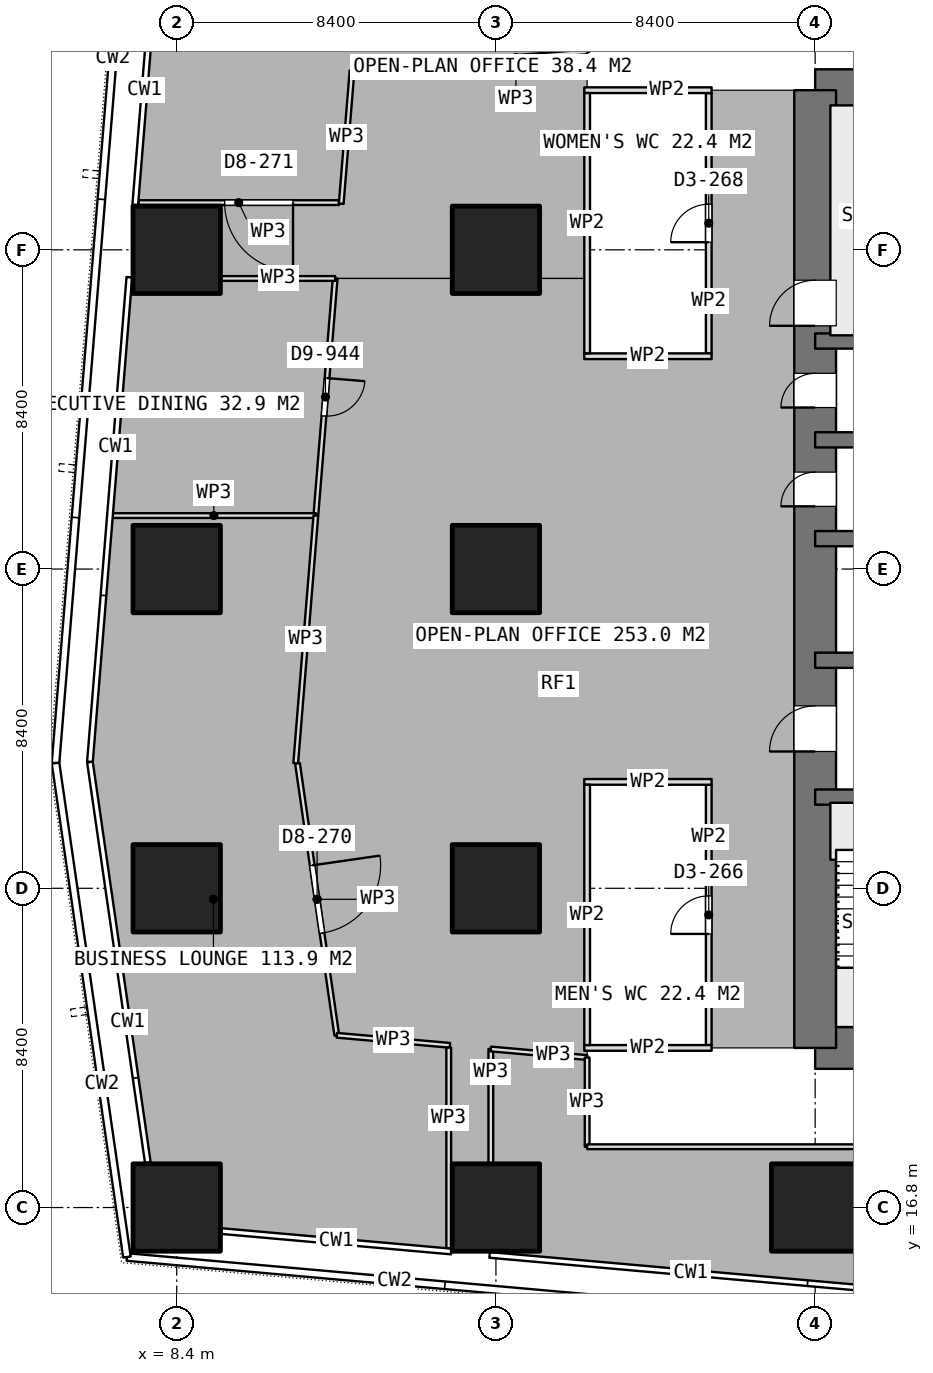
"""IFC4 building model, lengths in metres.
Left out: names, types, materials, properties, quantities, classifications, styles, units other than length and angle.
Written with IfcOpenShell. Run it as: python <this file> out.ifc"""

import sys

from ifc_helpers import new_model, si_unit, direction, frame, frame_2d, origin, origin_2d, place, context, subcontext, project, spatial, rectangle, extrude, element, fill, save


model = new_model("IFC4")
c1 = context("Model", 3, precision=1e-05, world=origin(), true_north=direction((0.0, 1.0)))
c2 = subcontext(c1, "Body", "Model", "MODEL_VIEW")
j1 = project(units=[si_unit("LENGTHUNIT", "METRE"), si_unit("PLANEANGLEUNIT", "RADIAN")], contexts=[c1])
p1 = place(None, origin())
s1 = spatial("IfcSite", under=j1, at=p1, CompositionType="ELEMENT")
p2 = place(p1, origin())
s2 = spatial("IfcBuilding", under=s1, at=p2, CompositionType="ELEMENT")
p3 = place(p2, frame((0.0, 0.0, 250.1)))
s3 = spatial("IfcBuildingStorey", under=s2, at=p3, CompositionType="ELEMENT", Elevation=250.1)
for number, where, z_axis, x_axis in (
    (1, (25.2, 21.0, 0.0), (0.0, 0.0, 1.0), (1.0, 0.0, 0.0)),
    (2, (25.2, 46.2, 0.0), (0.0, 0.0, 1.0), (1.0, 0.0, 0.0)),
):
    element("IfcWall", number, at=place(p3, frame(where, z_axis=z_axis, x_axis=x_axis)), inside=s3, PredefinedType="SHEAR", context=c2, shape_type="SweptSolid", body=[
        extrude(rectangle(XDim=10.4, YDim=1.1, at=frame_2d((5.2, 0.0))), origin(), (0.0, 0.0, 1.0), 3.75),
    ])
p4 = place(p3, frame((25.2, 21.0, 0.0), z_axis=(0.0, 0.0, 1.0), x_axis=(0.0, 1.0, 0.0)))
e3 = element("IfcWall", 3, at=p4, inside=s3, PredefinedType="SHEAR", context=c2, shape_type="SweptSolid", body=[
    extrude(rectangle(XDim=25.2, YDim=1.1, at=frame_2d((12.6, 0.0))), origin(), (0.0, 0.0, 1.0), 3.75),
])
p5 = place(p4, frame((7.8, 0.0, 0.0)))
e4 = element("IfcOpeningElement", 4, at=p5, cuts=e3, PredefinedType="OPENING", context=c2, shape_type="SweptSolid", body=[
    extrude(rectangle(XDim=1.2, YDim=2.1, at=frame_2d((0.6, 1.05))), frame((0.0, 0.56, 0.0), z_axis=(0.0, -1.0, 0.0), x_axis=(1.0, 0.0, 0.0)), (0.0, 0.0, 1.0), 1.12),
])
p6 = place(p4, frame((14.25, 0.0, 0.0)))
e5 = element("IfcOpeningElement", 5, at=p6, cuts=e3, PredefinedType="OPENING", context=c2, shape_type="SweptSolid", body=[
    extrude(rectangle(XDim=0.9, YDim=2.1, at=frame_2d((0.45, 1.05))), frame((0.0, 0.56, 0.0), z_axis=(0.0, -1.0, 0.0), x_axis=(1.0, 0.0, 0.0)), (0.0, 0.0, 1.0), 1.12),
])
p7 = place(p4, frame((16.85, 0.0, 0.0)))
e6 = element("IfcOpeningElement", 6, at=p7, cuts=e3, PredefinedType="OPENING", context=c2, shape_type="SweptSolid", body=[
    extrude(rectangle(XDim=0.9, YDim=2.1, at=frame_2d((0.45, 1.05))), frame((0.0, 0.56, 0.0), z_axis=(0.0, -1.0, 0.0), x_axis=(1.0, 0.0, 0.0)), (0.0, 0.0, 1.0), 1.12),
])
p8 = place(p4, frame((19.0, 0.0, 0.0)))
e7 = element("IfcOpeningElement", 7, at=p8, cuts=e3, PredefinedType="OPENING", context=c2, shape_type="SweptSolid", body=[
    extrude(rectangle(XDim=1.2, YDim=2.1, at=frame_2d((0.6, 1.05))), frame((0.0, 0.56, 0.0), z_axis=(0.0, -1.0, 0.0), x_axis=(1.0, 0.0, 0.0)), (0.0, 0.0, 1.0), 1.12),
])
p9 = place(p3, frame((25.2, 27.6, 0.0), z_axis=(0.0, 0.0, 1.0), x_axis=(1.0, 0.0, 0.0)))
e8 = element("IfcWall", 8, at=p9, inside=s3, PredefinedType="SHEAR", context=c2, shape_type="SweptSolid", body=[
    extrude(rectangle(XDim=6.6, YDim=0.4, at=frame_2d((3.3, 0.0))), origin(), (0.0, 0.0, 1.0), 3.75),
])
p10 = place(p9, frame((5.0, 0.0, 0.0)))
e9 = element("IfcOpeningElement", 9, at=p10, cuts=e8, PredefinedType="OPENING", context=c2, shape_type="SweptSolid", body=[
    extrude(rectangle(XDim=1.2, YDim=2.1, at=frame_2d((0.6, 1.05))), frame((0.0, 0.21, 0.0), z_axis=(0.0, -1.0, 0.0), x_axis=(1.0, 0.0, 0.0)), (0.0, 0.0, 1.0), 0.42),
])
p11 = place(p3, frame((25.2, 31.2, 0.0), z_axis=(0.0, 0.0, 1.0), x_axis=(1.0, 0.0, 0.0)))
e10 = element("IfcWall", 10, at=p11, inside=s3, PredefinedType="SHEAR", context=c2, shape_type="SweptSolid", body=[
    extrude(rectangle(XDim=6.6, YDim=0.4, at=frame_2d((3.3, 0.0))), origin(), (0.0, 0.0, 1.0), 3.75),
])
p12 = place(p11, frame((2.65, 0.0, 0.0)))
e11 = element("IfcOpeningElement", 11, at=p12, cuts=e10, PredefinedType="OPENING", context=c2, shape_type="SweptSolid", body=[
    extrude(rectangle(XDim=1.3, YDim=2.1, at=frame_2d((0.65, 1.05))), frame((0.0, 0.21, 0.0), z_axis=(0.0, -1.0, 0.0), x_axis=(1.0, 0.0, 0.0)), (0.0, 0.0, 1.0), 0.42),
])
for number, where, z_axis, x_axis in (
    (12, (25.2, 34.4, 0.0), (0.0, 0.0, 1.0), (1.0, 0.0, 0.0)),
    (13, (25.2, 37.0, 0.0), (0.0, 0.0, 1.0), (1.0, 0.0, 0.0)),
    (14, (25.2, 39.6, 0.0), (0.0, 0.0, 1.0), (1.0, 0.0, 0.0)),
):
    element("IfcWall", number, at=place(p3, frame(where, z_axis=z_axis, x_axis=x_axis)), inside=s3, PredefinedType="SHEAR", context=c2, shape_type="SweptSolid", body=[
        extrude(rectangle(XDim=6.6, YDim=0.4, at=frame_2d((3.3, 0.0))), origin(), (0.0, 0.0, 1.0), 3.75),
    ])
for number, where, z_axis, x_axis in (
    (15, (8.4, 16.8, 0.0), (0.0, 0.0, 1.0), (1.0, 0.0, 0.0)),
    (16, (8.4, 25.2, 0.0), (0.0, 0.0, 1.0), (1.0, 0.0, 0.0)),
    (17, (8.4, 33.6, 0.0), (0.0, 0.0, 1.0), (1.0, 0.0, 0.0)),
    (18, (8.4, 42.0, 0.0), (0.0, 0.0, 1.0), (1.0, 0.0, 0.0)),
    (19, (16.8, 16.8, 0.0), (0.0, 0.0, 1.0), (1.0, 0.0, 0.0)),
    (20, (16.8, 25.2, 0.0), (0.0, 0.0, 1.0), (1.0, 0.0, 0.0)),
    (21, (16.8, 33.6, 0.0), (0.0, 0.0, 1.0), (1.0, 0.0, 0.0)),
    (22, (16.8, 42.0, 0.0), (0.0, 0.0, 1.0), (1.0, 0.0, 0.0)),
    (23, (25.2, 16.8, 0.0), (0.0, 0.0, 1.0), (1.0, 0.0, 0.0)),
):
    element("IfcColumn", number, at=place(p3, frame(where, z_axis=z_axis, x_axis=x_axis)), inside=s3, PredefinedType="COLUMN", context=c2, shape_type="SweptSolid", body=[
        extrude(rectangle(XDim=2.3, YDim=2.3, at=origin_2d()), origin(), (0.0, 0.0, 1.0), 3.75),
    ])
for number, where, z_axis, x_axis in (
    (24, (19.125, 39.2, 0.0), (0.0, 0.0, 1.0), (1.0, 0.0, 0.0)),
    (25, (19.125, 46.2, 0.0), (0.0, 0.0, 1.0), (1.0, 0.0, 0.0)),
):
    element("IfcWall", number, at=place(p3, frame(where, z_axis=z_axis, x_axis=x_axis)), inside=s3, PredefinedType="PARTITIONING", context=c2, shape_type="SweptSolid", body=[
        extrude(rectangle(XDim=3.35, YDim=0.15, at=frame_2d((1.675, 0.0))), origin(), (0.0, 0.0, 1.0), 3.5),
    ])
p13 = place(p3, frame((19.2, 39.275, 0.0), z_axis=(0.0, 0.0, 1.0), x_axis=(0.0, 1.0, 0.0)))
e26 = element("IfcWall", 26, at=p13, inside=s3, PredefinedType="PARTITIONING", context=c2, shape_type="SweptSolid", body=[
    extrude(rectangle(XDim=6.85, YDim=0.15, at=frame_2d((3.425, 0.0))), origin(), (0.0, 0.0, 1.0), 3.5),
])
p14 = place(p3, frame((22.4, 39.275, 0.0), z_axis=(0.0, 0.0, 1.0), x_axis=(0.0, 1.0, 0.0)))
e27 = element("IfcWall", 27, at=p14, inside=s3, PredefinedType="PARTITIONING", context=c2, shape_type="SweptSolid", body=[
    extrude(rectangle(XDim=6.85, YDim=0.15, at=frame_2d((3.425, 0.0))), origin(), (0.0, 0.0, 1.0), 3.5),
])
p15 = place(p14, frame((2.925, 0.0, 0.0)))
e28 = element("IfcOpeningElement", 28, at=p15, cuts=e27, PredefinedType="OPENING", context=c2, shape_type="SweptSolid", body=[
    extrude(rectangle(XDim=1.0, YDim=2.1, at=frame_2d((0.5, 1.05))), frame((0.0, 0.085, 0.0), z_axis=(0.0, -1.0, 0.0), x_axis=(1.0, 0.0, 0.0)), (0.0, 0.0, 1.0), 0.17),
])
for number, where, z_axis, x_axis in (
    (29, (19.125, 21.0, 0.0), (0.0, 0.0, 1.0), (1.0, 0.0, 0.0)),
    (30, (19.125, 28.0, 0.0), (0.0, 0.0, 1.0), (1.0, 0.0, 0.0)),
):
    element("IfcWall", number, at=place(p3, frame(where, z_axis=z_axis, x_axis=x_axis)), inside=s3, PredefinedType="PARTITIONING", context=c2, shape_type="SweptSolid", body=[
        extrude(rectangle(XDim=3.35, YDim=0.15, at=frame_2d((1.675, 0.0))), origin(), (0.0, 0.0, 1.0), 3.5),
    ])
p16 = place(p3, frame((19.2, 21.075, 0.0), z_axis=(0.0, 0.0, 1.0), x_axis=(0.0, 1.0, 0.0)))
e31 = element("IfcWall", 31, at=p16, inside=s3, PredefinedType="PARTITIONING", context=c2, shape_type="SweptSolid", body=[
    extrude(rectangle(XDim=6.85, YDim=0.15, at=frame_2d((3.425, 0.0))), origin(), (0.0, 0.0, 1.0), 3.5),
])
p17 = place(p3, frame((22.4, 21.075, 0.0), z_axis=(0.0, 0.0, 1.0), x_axis=(0.0, 1.0, 0.0)))
e32 = element("IfcWall", 32, at=p17, inside=s3, PredefinedType="PARTITIONING", context=c2, shape_type="SweptSolid", body=[
    extrude(rectangle(XDim=6.85, YDim=0.15, at=frame_2d((3.425, 0.0))), origin(), (0.0, 0.0, 1.0), 3.5),
])
p18 = place(p17, frame((2.925, 0.0, 0.0)))
e33 = element("IfcOpeningElement", 33, at=p18, cuts=e32, PredefinedType="OPENING", context=c2, shape_type="SweptSolid", body=[
    extrude(rectangle(XDim=1.0, YDim=2.1, at=frame_2d((0.5, 1.05))), frame((0.0, 0.085, 0.0), z_axis=(0.0, -1.0, 0.0), x_axis=(1.0, 0.0, 0.0)), (0.0, 0.0, 1.0), 0.17),
])
p19 = place(p3, frame((12.669, 43.242, 0.0), z_axis=(0.0, 0.0, 1.0), x_axis=(-1.0, 0.0, 0.0)))
e34 = element("IfcWall", 34, at=p19, inside=s3, PredefinedType="PARTITIONING", context=c2, shape_type="SweptSolid", body=[
    extrude(rectangle(XDim=5.275, YDim=0.125, at=frame_2d((2.637, 0.0))), origin(), (0.0, 0.0, 1.0), 3.5),
])
p20 = place(p19, frame((1.208, 0.0, 0.0)))
e35 = element("IfcOpeningElement", 35, at=p20, cuts=e34, PredefinedType="OPENING", context=c2, shape_type="SweptSolid", body=[
    extrude(rectangle(XDim=1.8, YDim=2.1, at=frame_2d((0.9, 1.05))), frame((0.0, 0.073, 0.0), z_axis=(0.0, -1.0, 0.0), x_axis=(1.0, 0.0, 0.0)), (0.0, 0.0, 1.0), 0.145),
])
p21 = place(p3, frame((19.2, 47.209, 0.0), z_axis=(0.0, 0.0, 1.0), x_axis=(-0.996831568036, -0.079541341248, 0.0)))
e36 = element("IfcWall", 36, at=p21, inside=s3, PredefinedType="PARTITIONING", context=c2, shape_type="SweptSolid", body=[
    extrude(rectangle(XDim=3.76, YDim=0.125, at=frame_2d((1.88, 0.0))), origin(), (0.0, 0.0, 1.0), 3.5),
])
p22 = place(p3, frame((15.452, 46.91, 0.0), z_axis=(0.0, 0.0, 1.0), x_axis=(-0.996853884913, -0.079261164092, 0.0)))
e37 = element("IfcWall", 37, at=p22, inside=s3, PredefinedType="PARTITIONING", context=c2, shape_type="SweptSolid", body=[
    extrude(rectangle(XDim=2.446, YDim=0.125, at=frame_2d((1.223, 0.0))), origin(), (0.0, 0.0, 1.0), 3.5),
])
p23 = place(p3, frame((13.014, 46.716, 0.0), z_axis=(0.0, 0.0, 1.0), x_axis=(-0.081017185094, -0.996712704705, 0.0)))
e38 = element("IfcWall", 38, at=p23, inside=s3, PredefinedType="PARTITIONING", context=c2, shape_type="SweptSolid", body=[
    extrude(rectangle(XDim=3.517, YDim=0.125, at=frame_2d((1.758, 0.0))), origin(), (0.0, 0.0, 1.0), 3.5),
])
p24 = place(p3, frame((12.569, 41.246, 0.0), z_axis=(0.0, 0.0, 1.0), x_axis=(-0.081163543691, -0.996700797218, 0.0)))
e39 = element("IfcWall", 39, at=p24, inside=s3, PredefinedType="PARTITIONING", context=c2, shape_type="SweptSolid", body=[
    extrude(rectangle(XDim=6.26, YDim=0.125, at=frame_2d((3.13, 0.0))), origin(), (0.0, 0.0, 1.0), 3.5),
])
p25 = place(p24, frame((2.63, 0.0, 0.0)))
e40 = element("IfcOpeningElement", 40, at=p25, cuts=e39, PredefinedType="OPENING", context=c2, shape_type="SweptSolid", body=[
    extrude(rectangle(XDim=1.0, YDim=2.1, at=frame_2d((0.5, 1.05))), frame((0.0, 0.073, 0.0), z_axis=(0.0, -1.0, 0.0), x_axis=(1.0, 0.0, 0.0)), (0.0, 0.0, 1.0), 0.145),
])
p26 = place(p3, frame((12.061, 35.007, 0.0), z_axis=(0.0, 0.0, 1.0), x_axis=(-1.0, 0.0, 0.0)))
e41 = element("IfcWall", 41, at=p26, inside=s3, PredefinedType="PARTITIONING", context=c2, shape_type="SweptSolid", body=[
    extrude(rectangle(XDim=5.367, YDim=0.125, at=frame_2d((2.684, 0.0))), origin(), (0.0, 0.0, 1.0), 3.5),
])
p27 = place(p3, frame((9.57, 41.246, 0.0), z_axis=(0.0, 0.0, 1.0), x_axis=(1.0, 0.0, 0.0)))
e42 = element("IfcWall", 42, at=p27, inside=s3, PredefinedType="PARTITIONING", context=c2, shape_type="SweptSolid", body=[
    extrude(rectangle(XDim=2.999, YDim=0.125, at=frame_2d((1.5, 0.0))), origin(), (0.0, 0.0, 1.0), 3.5),
])
p28 = place(p3, frame((12.061, 35.006, 0.0), z_axis=(0.0, 0.0, 1.0), x_axis=(-0.081085632838, -0.996707138606, 0.0)))
e43 = element("IfcWall", 43, at=p28, inside=s3, PredefinedType="PARTITIONING", context=c2, shape_type="SweptSolid", body=[
    extrude(rectangle(XDim=6.537, YDim=0.125, at=frame_2d((3.268, 0.0))), origin(), (0.0, 0.0, 1.0), 3.5),
])
p29 = place(p3, frame((11.578, 28.487, 0.0), z_axis=(0.0, 0.0, 1.0), x_axis=(0.143071412146, -0.989712367825, 0.0)))
e44 = element("IfcWall", 44, at=p29, inside=s3, PredefinedType="PARTITIONING", context=c2, shape_type="SweptSolid", body=[
    extrude(rectangle(XDim=7.229, YDim=0.125, at=frame_2d((3.614, 0.0))), origin(), (0.0, 0.0, 1.0), 3.5),
])
p30 = place(p29, frame((2.712, 0.0, 0.0)))
e45 = element("IfcOpeningElement", 45, at=p30, cuts=e44, PredefinedType="OPENING", context=c2, shape_type="SweptSolid", body=[
    extrude(rectangle(XDim=1.8, YDim=2.1, at=frame_2d((0.9, 1.05))), frame((0.0, 0.073, 0.0), z_axis=(0.0, -1.0, 0.0), x_axis=(1.0, 0.0, 0.0)), (0.0, 0.0, 1.0), 0.145),
])
p31 = place(p3, frame((12.612, 21.333, 0.0), z_axis=(0.0, 0.0, 1.0), x_axis=(0.996064792479, -0.088628038366, 0.0)))
e46 = element("IfcWall", 46, at=p31, inside=s3, PredefinedType="PARTITIONING", context=c2, shape_type="SweptSolid", body=[
    extrude(rectangle(XDim=2.989, YDim=0.125, at=frame_2d((1.494, 0.0))), origin(), (0.0, 0.0, 1.0), 3.5),
])
p32 = place(p3, frame((15.558, 21.008, 0.0), z_axis=(0.0, 0.0, 1.0), x_axis=(0.0, -1.0, 0.0)))
e47 = element("IfcWall", 47, at=p32, inside=s3, PredefinedType="PARTITIONING", context=c2, shape_type="SweptSolid", body=[
    extrude(rectangle(XDim=5.278, YDim=0.125, at=frame_2d((2.639, 0.0))), origin(), (0.0, 0.0, 1.0), 3.5),
])
p33 = place(p3, frame((16.666, 17.97, 0.0), z_axis=(0.0, 0.0, 1.0), x_axis=(0.0, 1.0, 0.0)))
e48 = element("IfcWall", 48, at=p33, inside=s3, PredefinedType="PARTITIONING", context=c2, shape_type="SweptSolid", body=[
    extrude(rectangle(XDim=3.002, YDim=0.125, at=frame_2d((1.501, 0.0))), origin(), (0.0, 0.0, 1.0), 3.5),
])
p34 = place(p3, frame((16.666, 20.972, 0.0), z_axis=(0.0, 0.0, 1.0), x_axis=(0.996085983525, -0.08838955495, 0.0)))
e49 = element("IfcWall", 49, at=p34, inside=s3, PredefinedType="PARTITIONING", context=c2, shape_type="SweptSolid", body=[
    extrude(rectangle(XDim=2.544, YDim=0.125, at=frame_2d((1.272, 0.0))), origin(), (0.0, 0.0, 1.0), 3.5),
])
p35 = place(p3, frame((19.2, 20.747, 0.0), z_axis=(0.0, 0.0, 1.0), x_axis=(0.0, -1.0, 0.0)))
e50 = element("IfcWall", 50, at=p35, inside=s3, PredefinedType="PARTITIONING", context=c2, shape_type="SweptSolid", body=[
    extrude(rectangle(XDim=2.347, YDim=0.125, at=frame_2d((1.174, 0.0))), origin(), (0.0, 0.0, 1.0), 3.5),
])
p36 = place(p3, frame((19.2, 18.4, 0.0), z_axis=(0.0, 0.0, 1.0), x_axis=(1.0, 0.0, 0.0)))
e51 = element("IfcWall", 51, at=p36, inside=s3, PredefinedType="PARTITIONING", context=c2, shape_type="SweptSolid", body=[
    extrude(rectangle(XDim=15.803, YDim=0.125, at=frame_2d((7.901, 0.0))), origin(), (0.0, 0.0, 1.0), 3.5),
])
p37 = place(p36, frame((7.201, 0.0, 0.0)))
e52 = element("IfcOpeningElement", 52, at=p37, cuts=e51, PredefinedType="OPENING", context=c2, shape_type="SweptSolid", body=[
    extrude(rectangle(XDim=1.8, YDim=2.1, at=frame_2d((0.9, 1.05))), frame((0.0, 0.073, 0.0), z_axis=(0.0, -1.0, 0.0), x_axis=(1.0, 0.0, 0.0)), (0.0, 0.0, 1.0), 0.145),
])
p38 = place(p5, origin())
e53 = element("IfcDoor", 53, at=p38, inside=s3, OperationType="SINGLE_SWING_LEFT", PredefinedType="DOOR", context=c2, shape_type="SweptSolid", body=[
    extrude(rectangle(XDim=1.2, YDim=2.1, at=frame_2d((0.6, 1.05))), frame((0.0, 0.025, 0.0), z_axis=(0.0, -1.0, 0.0), x_axis=(1.0, 0.0, 0.0)), (0.0, 0.0, 1.0), 0.05),
])
fill(e4, e53)
p39 = place(p6, origin())
e54 = element("IfcDoor", 54, at=p39, inside=s3, OperationType="SINGLE_SWING_LEFT", PredefinedType="DOOR", context=c2, shape_type="SweptSolid", body=[
    extrude(rectangle(XDim=0.9, YDim=2.1, at=frame_2d((0.45, 1.05))), frame((0.0, 0.025, 0.0), z_axis=(0.0, -1.0, 0.0), x_axis=(1.0, 0.0, 0.0)), (0.0, 0.0, 1.0), 0.05),
])
fill(e5, e54)
p40 = place(p7, origin())
e55 = element("IfcDoor", 55, at=p40, inside=s3, OperationType="SINGLE_SWING_LEFT", PredefinedType="DOOR", context=c2, shape_type="SweptSolid", body=[
    extrude(rectangle(XDim=0.9, YDim=2.1, at=frame_2d((0.45, 1.05))), frame((0.0, 0.025, 0.0), z_axis=(0.0, -1.0, 0.0), x_axis=(1.0, 0.0, 0.0)), (0.0, 0.0, 1.0), 0.05),
])
fill(e6, e55)
p41 = place(p15, origin())
e56 = element("IfcDoor", 56, at=p41, inside=s3, OperationType="SINGLE_SWING_LEFT", PredefinedType="DOOR", context=c2, shape_type="SweptSolid", body=[
    extrude(rectangle(XDim=1.0, YDim=2.1, at=frame_2d((0.5, 1.05))), frame((0.0, 0.025, 0.0), z_axis=(0.0, -1.0, 0.0), x_axis=(1.0, 0.0, 0.0)), (0.0, 0.0, 1.0), 0.05),
])
fill(e28, e56)
p42 = place(p18, origin())
e57 = element("IfcDoor", 57, at=p42, inside=s3, OperationType="SINGLE_SWING_LEFT", PredefinedType="DOOR", context=c2, shape_type="SweptSolid", body=[
    extrude(rectangle(XDim=1.0, YDim=2.1, at=frame_2d((0.5, 1.05))), frame((0.0, 0.025, 0.0), z_axis=(0.0, -1.0, 0.0), x_axis=(1.0, 0.0, 0.0)), (0.0, 0.0, 1.0), 0.05),
])
fill(e33, e57)
p43 = place(p20, origin())
e58 = element("IfcDoor", 58, at=p43, inside=s3, OperationType="DOUBLE_DOOR_SINGLE_SWING", PredefinedType="DOOR", context=c2, shape_type="SweptSolid", body=[
    extrude(rectangle(XDim=1.8, YDim=2.1, at=frame_2d((0.9, 1.05))), frame((0.0, 0.025, 0.0), z_axis=(0.0, -1.0, 0.0), x_axis=(1.0, 0.0, 0.0)), (0.0, 0.0, 1.0), 0.05),
])
fill(e35, e58)
p44 = place(p25, origin())
e59 = element("IfcDoor", 59, at=p44, inside=s3, OperationType="SINGLE_SWING_LEFT", PredefinedType="DOOR", context=c2, shape_type="SweptSolid", body=[
    extrude(rectangle(XDim=1.0, YDim=2.1, at=frame_2d((0.5, 1.05))), frame((0.0, 0.025, 0.0), z_axis=(0.0, -1.0, 0.0), x_axis=(1.0, 0.0, 0.0)), (0.0, 0.0, 1.0), 0.05),
])
fill(e40, e59)
p45 = place(p30, origin())
e60 = element("IfcDoor", 60, at=p45, inside=s3, OperationType="DOUBLE_DOOR_SINGLE_SWING", PredefinedType="DOOR", context=c2, shape_type="SweptSolid", body=[
    extrude(rectangle(XDim=1.8, YDim=2.1, at=frame_2d((0.9, 1.05))), frame((0.0, 0.025, 0.0), z_axis=(0.0, -1.0, 0.0), x_axis=(1.0, 0.0, 0.0)), (0.0, 0.0, 1.0), 0.05),
])
fill(e45, e60)
p46 = place(p8, origin())
e61 = element("IfcDoor", 61, at=p46, inside=s3, OperationType="SINGLE_SWING_RIGHT", PredefinedType="DOOR", context=c2, shape_type="SweptSolid", body=[
    extrude(rectangle(XDim=1.2, YDim=2.1, at=frame_2d((0.6, 1.05))), frame((0.0, 0.025, 0.0), z_axis=(0.0, -1.0, 0.0), x_axis=(1.0, 0.0, 0.0)), (0.0, 0.0, 1.0), 0.05),
])
fill(e7, e61)
save(model, sys.argv[1])
